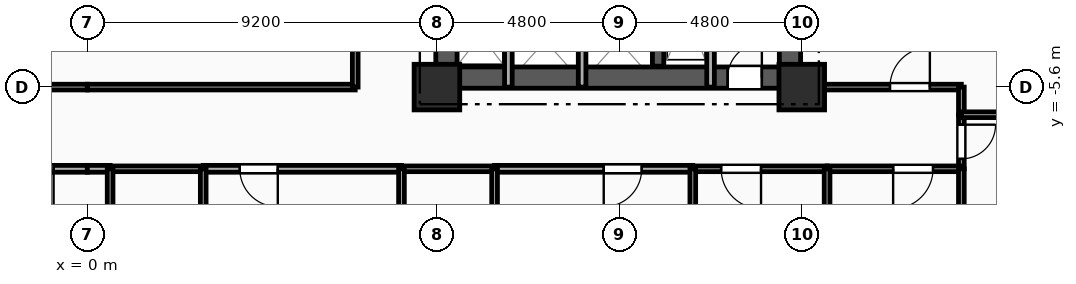
"""IFC4 building model, lengths in metres.
Left out: names, types, materials, properties, quantities, classifications, styles, units other than length and angle.
Written with IfcOpenShell. Run it as: python <this file> out.ifc"""

import sys

from ifc_helpers import new_model, si_unit, direction, frame, frame_2d, origin, origin_2d, place, context, subcontext, project, spatial, rectangle, extrude, element, fill, save


model = new_model("IFC4")
c1 = context("Model", 3, precision=1e-05, world=origin(), true_north=direction((0.0, 1.0)))
c2 = subcontext(c1, "Body", "Model", "MODEL_VIEW")
j1 = project(units=[si_unit("LENGTHUNIT", "METRE"), si_unit("PLANEANGLEUNIT", "RADIAN")], contexts=[c1])
p1 = place(None, origin())
s1 = spatial("IfcSite", under=j1, at=p1, CompositionType="ELEMENT")
p2 = place(p1, origin())
s2 = spatial("IfcBuilding", under=s1, at=p2, CompositionType="ELEMENT")
p3 = place(p2, frame((0.0, 0.0, 37.05)))
s3 = spatial("IfcBuildingStorey", under=s2, at=p3, CompositionType="ELEMENT", Elevation=37.05)
for number, where, z_axis, x_axis in (
    (1, (9.2, -5.6, 0.0), (0.0, 0.0, 1.0), (1.0, 0.0, 0.0)),
    (2, (18.8, -5.6, 0.0), (0.0, 0.0, 1.0), (1.0, 0.0, 0.0)),
):
    element("IfcColumn", number, at=place(p3, frame(where, z_axis=z_axis, x_axis=x_axis)), inside=s3, PredefinedType="COLUMN", context=c2, shape_type="SweptSolid", body=[
        extrude(rectangle(XDim=1.2, YDim=1.2, at=origin_2d()), origin(), (0.0, 0.0, 1.0), 3.35),
    ])
p4 = place(p3, frame((9.2, -5.35, 0.0), z_axis=(0.0, 0.0, 1.0), x_axis=(1.0, 0.0, 0.0)))
e3 = element("IfcWall", 3, at=p4, inside=s3, PredefinedType="SHEAR", context=c2, shape_type="SweptSolid", body=[
    extrude(rectangle(XDim=9.6, YDim=0.56, at=frame_2d((4.8, 0.0))), origin(), (0.0, 0.0, 1.0), 3.035),
])
p5 = place(p4, frame((7.65, 0.0, 0.0)))
e4 = element("IfcOpeningElement", 4, at=p5, cuts=e3, PredefinedType="OPENING", context=c2, shape_type="SweptSolid", body=[
    extrude(rectangle(XDim=0.9, YDim=2.1, at=frame_2d((0.45, 1.05))), frame((0.0, 0.29, 0.0), z_axis=(0.0, -1.0, 0.0), x_axis=(1.0, 0.0, 0.0)), (0.0, 0.0, 1.0), 0.58),
])
p6 = place(p3, frame((9.45, -5.05, 0.0), z_axis=(0.0, 0.0, 1.0), x_axis=(0.0, 1.0, 0.0)))
e5 = element("IfcWall", 5, at=p6, inside=s3, PredefinedType="SHEAR", context=c2, shape_type="SweptSolid", body=[
    extrude(rectangle(XDim=10.1, YDim=0.56, at=frame_2d((5.05, 0.0))), origin(), (0.0, 0.0, 1.0), 3.035),
])
p7 = place(p6, frame((7.15, 0.0, 0.0)))
e6 = element("IfcOpeningElement", 6, at=p7, cuts=e5, PredefinedType="OPENING", context=c2, shape_type="SweptSolid", body=[
    extrude(rectangle(XDim=0.9, YDim=2.1, at=frame_2d((0.45, 1.05))), frame((0.0, 0.29, 0.0), z_axis=(0.0, -1.0, 0.0), x_axis=(1.0, 0.0, 0.0)), (0.0, 0.0, 1.0), 0.58),
])
p8 = place(p6, frame((2.4, 0.0, 0.0)))
e7 = element("IfcOpeningElement", 7, at=p8, cuts=e5, PredefinedType="OPENING", context=c2, shape_type="SweptSolid", body=[
    extrude(rectangle(XDim=1.2, YDim=2.15, at=frame_2d((0.6, 1.075))), frame((0.0, 0.29, 0.0), z_axis=(0.0, -1.0, 0.0), x_axis=(1.0, 0.0, 0.0)), (0.0, 0.0, 1.0), 0.58),
])
p9 = place(p3, frame((18.49, -5.05, 0.0), z_axis=(0.0, 0.0, 1.0), x_axis=(0.0, 1.0, 0.0)))
e8 = element("IfcWall", 8, at=p9, inside=s3, PredefinedType="SHEAR", context=c2, shape_type="SweptSolid", body=[
    extrude(rectangle(XDim=10.1, YDim=0.56, at=frame_2d((5.05, 0.0))), origin(), (0.0, 0.0, 1.0), 3.035),
])
p10 = place(p3, frame((15.02, -5.05, 0.0), z_axis=(0.0, 0.0, 1.0), x_axis=(0.0, 1.0, 0.0)))
e9 = element("IfcWall", 9, at=p10, inside=s3, PredefinedType="SHEAR", context=c2, shape_type="SweptSolid", body=[
    extrude(rectangle(XDim=10.1, YDim=0.3, at=frame_2d((5.05, 0.0))), origin(), (0.0, 0.0, 1.0), 3.035),
])
p11 = place(p3, frame((16.4, -2.11, 0.0), z_axis=(0.0, 0.0, 1.0), x_axis=(0.0, -1.0, 0.0)))
e10 = element("IfcWall", 10, at=p11, inside=s3, PredefinedType="PARTITIONING", context=c2, shape_type="SweptSolid", body=[
    extrude(rectangle(XDim=3.49, YDim=0.2, at=frame_2d((1.745, 0.0))), origin(), (0.0, 0.0, 1.0), 3.035),
])
for number, where, z_axis, x_axis in (
    (11, (11.08, -5.6, 0.0), (0.0, 0.0, 1.0), (0.0, 1.0, 0.0)),
    (12, (13.02, -5.6, 0.0), (0.0, 0.0, 1.0), (0.0, 1.0, 0.0)),
):
    element("IfcWall", number, at=place(p3, frame(where, z_axis=z_axis, x_axis=x_axis)), inside=s3, PredefinedType="PARTITIONING", context=c2, shape_type="SweptSolid", body=[
        extrude(rectangle(XDim=2.25, YDim=0.2, at=frame_2d((1.125, 0.0))), origin(), (0.0, 0.0, 1.0), 3.035),
    ])
p12 = place(p3, frame((0.0, -7.75, 0.0), z_axis=(0.0, 0.0, 1.0), x_axis=(-1.0, 0.0, 0.0)))
e13 = element("IfcWall", 13, at=p12, inside=s3, PredefinedType="PARTITIONING", context=c2, shape_type="SweptSolid", body=[
    extrude(rectangle(XDim=4.617, YDim=0.18, at=frame_2d((2.309, 0.0))), origin(), (0.0, 0.0, 1.0), 3.035),
])
p13 = place(p12, frame((0.887, 0.0, 0.0)))
e14 = element("IfcOpeningElement", 14, at=p13, cuts=e13, PredefinedType="OPENING", context=c2, shape_type="SweptSolid", body=[
    extrude(rectangle(XDim=1.0, YDim=2.15, at=frame_2d((0.5, 1.075))), frame((0.0, 0.1, 0.0), z_axis=(0.0, -1.0, 0.0), x_axis=(1.0, 0.0, 0.0)), (0.0, 0.0, 1.0), 0.2),
])
p14 = place(p3, frame((-7.05, -5.6, 0.0), z_axis=(0.0, 0.0, 1.0), x_axis=(1.0, 0.0, 0.0)))
e15 = element("IfcWall", 15, at=p14, inside=s3, PredefinedType="PARTITIONING", context=c2, shape_type="SweptSolid", body=[
    extrude(rectangle(XDim=7.05, YDim=0.15, at=frame_2d((3.525, 0.0))), origin(), (0.0, 0.0, 1.0), 2.52),
])
p15 = place(p14, frame((4.815, 0.0, 0.0)))
e16 = element("IfcOpeningElement", 16, at=p15, cuts=e15, PredefinedType="OPENING", context=c2, shape_type="SweptSolid", body=[
    extrude(rectangle(XDim=1.05, YDim=2.15, at=frame_2d((0.525, 1.075))), frame((0.0, 0.085, 0.0), z_axis=(0.0, -1.0, 0.0), x_axis=(1.0, 0.0, 0.0)), (0.0, 0.0, 1.0), 0.17),
])
p16 = place(p3, frame((23.0, -6.327, 0.0), z_axis=(0.0, 0.0, 1.0), x_axis=(0.0, -1.0, 0.0)))
e17 = element("IfcWall", 17, at=p16, inside=s3, PredefinedType="PARTITIONING", context=c2, shape_type="SweptSolid", body=[
    extrude(rectangle(XDim=1.423, YDim=0.15, at=frame_2d((0.711, 0.0))), origin(), (0.0, 0.0, 1.0), 3.035),
])
p17 = place(p16, frame((0.261, 0.0, 0.0)))
e18 = element("IfcOpeningElement", 18, at=p17, cuts=e17, PredefinedType="OPENING", context=c2, shape_type="SweptSolid", body=[
    extrude(rectangle(XDim=0.9, YDim=2.1, at=frame_2d((0.45, 1.05))), frame((0.0, 0.085, 0.0), z_axis=(0.0, -1.0, 0.0), x_axis=(1.0, 0.0, 0.0)), (0.0, 0.0, 1.0), 0.17),
])
p18 = place(p3, frame((18.8, -5.6, 0.0), z_axis=(0.0, 0.0, 1.0), x_axis=(1.0, 0.0, 0.0)))
e19 = element("IfcWall", 19, at=p18, inside=s3, PredefinedType="PARTITIONING", context=c2, shape_type="SweptSolid", body=[
    extrude(rectangle(XDim=4.2, YDim=0.15, at=frame_2d((2.1, 0.0))), origin(), (0.0, 0.0, 1.0), 3.035),
])
p19 = place(p18, frame((2.321, 0.0, 0.0)))
e20 = element("IfcOpeningElement", 20, at=p19, cuts=e19, PredefinedType="OPENING", context=c2, shape_type="SweptSolid", body=[
    extrude(rectangle(XDim=1.05, YDim=2.15, at=frame_2d((0.525, 1.075))), frame((0.0, 0.085, 0.0), z_axis=(0.0, -1.0, 0.0), x_axis=(1.0, 0.0, 0.0)), (0.0, 0.0, 1.0), 0.17),
])
p20 = place(p3, frame((23.0, -5.6, 0.0), z_axis=(0.0, 0.0, 1.0), x_axis=(0.0, -1.0, 0.0)))
e21 = element("IfcWall", 21, at=p20, inside=s3, PredefinedType="PARTITIONING", context=c2, shape_type="SweptSolid", body=[
    extrude(rectangle(XDim=0.727, YDim=0.15, at=frame_2d((0.363, 0.0))), origin(), (0.0, 0.0, 1.0), 3.035),
])
p21 = place(p3, frame((0.6, -7.75, 0.0), z_axis=(0.0, 0.0, 1.0), x_axis=(-1.0, 0.0, 0.0)))
e22 = element("IfcWall", 22, at=p21, inside=s3, PredefinedType="PARTITIONING", context=c2, shape_type="SweptSolid", body=[
    extrude(rectangle(XDim=0.6, YDim=0.18, at=frame_2d((0.3, 0.0))), origin(), (0.0, 0.0, 1.0), 3.035),
])
p22 = place(p3, frame((8.267, -7.75, 0.0), z_axis=(0.0, 0.0, 1.0), x_axis=(-1.0, 0.0, 0.0)))
e23 = element("IfcWall", 23, at=p22, inside=s3, PredefinedType="PARTITIONING", context=c2, shape_type="SweptSolid", body=[
    extrude(rectangle(XDim=5.217, YDim=0.18, at=frame_2d((2.608, 0.0))), origin(), (0.0, 0.0, 1.0), 3.035),
])
p23 = place(p22, frame((3.255, 0.0, 0.0)))
e24 = element("IfcOpeningElement", 24, at=p23, cuts=e23, PredefinedType="OPENING", context=c2, shape_type="SweptSolid", body=[
    extrude(rectangle(XDim=1.0, YDim=2.15, at=frame_2d((0.5, 1.075))), frame((0.0, 0.1, 0.0), z_axis=(0.0, -1.0, 0.0), x_axis=(1.0, 0.0, 0.0)), (0.0, 0.0, 1.0), 0.2),
])
p24 = place(p3, frame((3.05, -7.75, 0.0), z_axis=(0.0, 0.0, 1.0), x_axis=(-1.0, 0.0, 0.0)))
e25 = element("IfcWall", 25, at=p24, inside=s3, PredefinedType="PLUMBINGWALL", context=c2, shape_type="SweptSolid", body=[
    extrude(rectangle(XDim=2.45, YDim=0.15, at=frame_2d((1.225, 0.0))), origin(), (0.0, 0.0, 1.0), 3.035),
])
p25 = place(p3, frame((15.933, -7.75, 0.0), z_axis=(0.0, 0.0, 1.0), x_axis=(-1.0, 0.0, 0.0)))
e26 = element("IfcWall", 26, at=p25, inside=s3, PredefinedType="PARTITIONING", context=c2, shape_type="SweptSolid", body=[
    extrude(rectangle(XDim=5.216, YDim=0.18, at=frame_2d((2.608, 0.0))), origin(), (0.0, 0.0, 1.0), 3.035),
])
p26 = place(p25, frame((1.344, 0.0, 0.0)))
e27 = element("IfcOpeningElement", 27, at=p26, cuts=e26, PredefinedType="OPENING", context=c2, shape_type="SweptSolid", body=[
    extrude(rectangle(XDim=1.0, YDim=2.15, at=frame_2d((0.5, 1.075))), frame((0.0, 0.1, 0.0), z_axis=(0.0, -1.0, 0.0), x_axis=(1.0, 0.0, 0.0)), (0.0, 0.0, 1.0), 0.2),
])
p27 = place(p3, frame((10.717, -7.75, 0.0), z_axis=(0.0, 0.0, 1.0), x_axis=(-1.0, 0.0, 0.0)))
e28 = element("IfcWall", 28, at=p27, inside=s3, PredefinedType="PLUMBINGWALL", context=c2, shape_type="SweptSolid", body=[
    extrude(rectangle(XDim=2.45, YDim=0.15, at=frame_2d((1.225, 0.0))), origin(), (0.0, 0.0, 1.0), 3.035),
])
p28 = place(p3, frame((19.467, -7.75, 0.0), z_axis=(0.0, 0.0, 1.0), x_axis=(-1.0, 0.0, 0.0)))
e29 = element("IfcWall", 29, at=p28, inside=s3, PredefinedType="PARTITIONING", context=c2, shape_type="SweptSolid", body=[
    extrude(rectangle(XDim=3.533, YDim=0.15, at=frame_2d((1.767, 0.0))), origin(), (0.0, 0.0, 1.0), 3.035),
])
p29 = place(p28, frame((1.738, 0.0, 0.0)))
e30 = element("IfcOpeningElement", 30, at=p29, cuts=e29, PredefinedType="OPENING", context=c2, shape_type="SweptSolid", body=[
    extrude(rectangle(XDim=1.05, YDim=2.15, at=frame_2d((0.525, 1.075))), frame((0.0, 0.085, 0.0), z_axis=(0.0, -1.0, 0.0), x_axis=(1.0, 0.0, 0.0)), (0.0, 0.0, 1.0), 0.17),
])
p30 = place(p3, frame((23.0, -7.75, 0.0), z_axis=(0.0, 0.0, 1.0), x_axis=(-1.0, 0.0, 0.0)))
e31 = element("IfcWall", 31, at=p30, inside=s3, PredefinedType="PARTITIONING", context=c2, shape_type="SweptSolid", body=[
    extrude(rectangle(XDim=3.533, YDim=0.15, at=frame_2d((1.767, 0.0))), origin(), (0.0, 0.0, 1.0), 3.035),
])
p31 = place(p30, frame((0.745, 0.0, 0.0)))
e32 = element("IfcOpeningElement", 32, at=p31, cuts=e31, PredefinedType="OPENING", context=c2, shape_type="SweptSolid", body=[
    extrude(rectangle(XDim=1.05, YDim=2.15, at=frame_2d((0.525, 1.075))), frame((0.0, 0.085, 0.0), z_axis=(0.0, -1.0, 0.0), x_axis=(1.0, 0.0, 0.0)), (0.0, 0.0, 1.0), 0.17),
])
p32 = place(p3, frame((0.0, -5.6, 0.0), z_axis=(0.0, 0.0, 1.0), x_axis=(1.0, 0.0, 0.0)))
e33 = element("IfcWall", 33, at=p32, inside=s3, PredefinedType="PARTITIONING", context=c2, shape_type="SweptSolid", body=[
    extrude(rectangle(XDim=7.05, YDim=0.15, at=frame_2d((3.525, 0.0))), origin(), (0.0, 0.0, 1.0), 2.52),
])
p33 = place(p3, frame((7.05, -5.6, 0.0), z_axis=(0.0, 0.0, 1.0), x_axis=(0.0, 1.0, 0.0)))
e34 = element("IfcWall", 34, at=p33, inside=s3, PredefinedType="PARTITIONING", context=c2, shape_type="SweptSolid", body=[
    extrude(rectangle(XDim=7.05, YDim=0.15, at=frame_2d((3.525, 0.0))), origin(), (0.0, 0.0, 1.0), 3.035),
])
p34 = place(p3, frame((23.0, -6.327, 0.0), z_axis=(0.0, 0.0, 1.0), x_axis=(1.0, 0.0, 0.0)))
e35 = element("IfcWall", 35, at=p34, inside=s3, PredefinedType="PARTITIONING", context=c2, shape_type="SweptSolid", body=[
    extrude(rectangle(XDim=2.59, YDim=0.15, at=frame_2d((1.295, 0.0))), origin(), (0.0, 0.0, 1.0), 3.035),
])
p35 = place(p3, frame((23.0, -19.4, 0.0), z_axis=(0.0, 0.0, 1.0), x_axis=(0.0, 1.0, 0.0)))
e36 = element("IfcWall", 36, at=p35, inside=s3, PredefinedType="PARTITIONING", context=c2, shape_type="SweptSolid", body=[
    extrude(rectangle(XDim=11.65, YDim=0.15, at=frame_2d((5.825, 0.0))), origin(), (0.0, 0.0, 1.0), 3.035),
])
for number, where, z_axis, x_axis in (
    (37, (0.6, -7.75, 0.0), (0.0, 0.0, 1.0), (0.0, -1.0, 0.0)),
    (38, (3.05, -9.9, 0.0), (0.0, 0.0, 1.0), (0.0, 1.0, 0.0)),
    (39, (8.267, -7.75, 0.0), (0.0, 0.0, 1.0), (0.0, -1.0, 0.0)),
    (40, (10.717, -9.9, 0.0), (0.0, 0.0, 1.0), (0.0, 1.0, 0.0)),
):
    element("IfcWall", number, at=place(p3, frame(where, z_axis=z_axis, x_axis=x_axis)), inside=s3, PredefinedType="PLUMBINGWALL", context=c2, shape_type="SweptSolid", body=[
        extrude(rectangle(XDim=2.15, YDim=0.15, at=frame_2d((1.075, 0.0))), origin(), (0.0, 0.0, 1.0), 3.035),
    ])
for number, where, z_axis, x_axis in (
    (41, (15.933, -7.75, 0.0), (0.0, 0.0, 1.0), (0.0, -1.0, 0.0)),
    (42, (19.467, -7.75, 0.0), (0.0, 0.0, 1.0), (0.0, -1.0, 0.0)),
):
    element("IfcWall", number, at=place(p3, frame(where, z_axis=z_axis, x_axis=x_axis)), inside=s3, PredefinedType="PARTITIONING", context=c2, shape_type="SweptSolid", body=[
        extrude(rectangle(XDim=11.65, YDim=0.15, at=frame_2d((5.825, 0.0))), origin(), (0.0, 0.0, 1.0), 3.035),
    ])
p36 = place(p5, origin())
e43 = element("IfcDoor", 43, at=p36, inside=s3, OperationType="SINGLE_SWING_RIGHT", PredefinedType="DOOR", context=c2, shape_type="SweptSolid", body=[
    extrude(rectangle(XDim=0.9, YDim=2.1, at=frame_2d((0.45, 1.05))), frame((0.0, 0.025, 0.0), z_axis=(0.0, -1.0, 0.0), x_axis=(1.0, 0.0, 0.0)), (0.0, 0.0, 1.0), 0.05),
])
fill(e4, e43)
p37 = place(p13, origin())
e44 = element("IfcDoor", 44, at=p37, inside=s3, OperationType="SINGLE_SWING_LEFT", PredefinedType="DOOR", context=c2, shape_type="SweptSolid", body=[
    extrude(rectangle(XDim=1.0, YDim=2.15, at=frame_2d((0.5, 1.075))), frame((0.0, 0.025, 0.0), z_axis=(0.0, -1.0, 0.0), x_axis=(1.0, 0.0, 0.0)), (0.0, 0.0, 1.0), 0.05),
])
fill(e14, e44)
p38 = place(p17, origin())
e45 = element("IfcDoor", 45, at=p38, inside=s3, OperationType="SINGLE_SWING_LEFT", PredefinedType="DOOR", context=c2, shape_type="SweptSolid", body=[
    extrude(rectangle(XDim=0.9, YDim=2.1, at=frame_2d((0.45, 1.05))), frame((0.0, 0.025, 0.0), z_axis=(0.0, -1.0, 0.0), x_axis=(1.0, 0.0, 0.0)), (0.0, 0.0, 1.0), 0.05),
])
fill(e18, e45)
p39 = place(p19, origin())
e46 = element("IfcDoor", 46, at=p39, inside=s3, OperationType="SINGLE_SWING_RIGHT", PredefinedType="DOOR", context=c2, shape_type="SweptSolid", body=[
    extrude(rectangle(XDim=1.05, YDim=2.15, at=frame_2d((0.525, 1.075))), frame((0.0, 0.025, 0.0), z_axis=(0.0, -1.0, 0.0), x_axis=(1.0, 0.0, 0.0)), (0.0, 0.0, 1.0), 0.05),
])
fill(e20, e46)
p40 = place(p23, origin())
e47 = element("IfcDoor", 47, at=p40, inside=s3, OperationType="SINGLE_SWING_LEFT", PredefinedType="DOOR", context=c2, shape_type="SweptSolid", body=[
    extrude(rectangle(XDim=1.0, YDim=2.15, at=frame_2d((0.5, 1.075))), frame((0.0, 0.025, 0.0), z_axis=(0.0, -1.0, 0.0), x_axis=(1.0, 0.0, 0.0)), (0.0, 0.0, 1.0), 0.05),
])
fill(e24, e47)
p41 = place(p26, origin())
e48 = element("IfcDoor", 48, at=p41, inside=s3, OperationType="SINGLE_SWING_RIGHT", PredefinedType="DOOR", context=c2, shape_type="SweptSolid", body=[
    extrude(rectangle(XDim=1.0, YDim=2.15, at=frame_2d((0.5, 1.075))), frame((0.0, 0.025, 0.0), z_axis=(0.0, -1.0, 0.0), x_axis=(1.0, 0.0, 0.0)), (0.0, 0.0, 1.0), 0.05),
])
fill(e27, e48)
p42 = place(p29, origin())
e49 = element("IfcDoor", 49, at=p42, inside=s3, OperationType="SINGLE_SWING_LEFT", PredefinedType="DOOR", context=c2, shape_type="SweptSolid", body=[
    extrude(rectangle(XDim=1.05, YDim=2.15, at=frame_2d((0.525, 1.075))), frame((0.0, 0.025, 0.0), z_axis=(0.0, -1.0, 0.0), x_axis=(1.0, 0.0, 0.0)), (0.0, 0.0, 1.0), 0.05),
])
fill(e30, e49)
p43 = place(p31, origin())
e50 = element("IfcDoor", 50, at=p43, inside=s3, OperationType="SINGLE_SWING_RIGHT", PredefinedType="DOOR", context=c2, shape_type="SweptSolid", body=[
    extrude(rectangle(XDim=1.05, YDim=2.15, at=frame_2d((0.525, 1.075))), frame((0.0, 0.025, 0.0), z_axis=(0.0, -1.0, 0.0), x_axis=(1.0, 0.0, 0.0)), (0.0, 0.0, 1.0), 0.05),
])
fill(e32, e50)
save(model, sys.argv[1])
